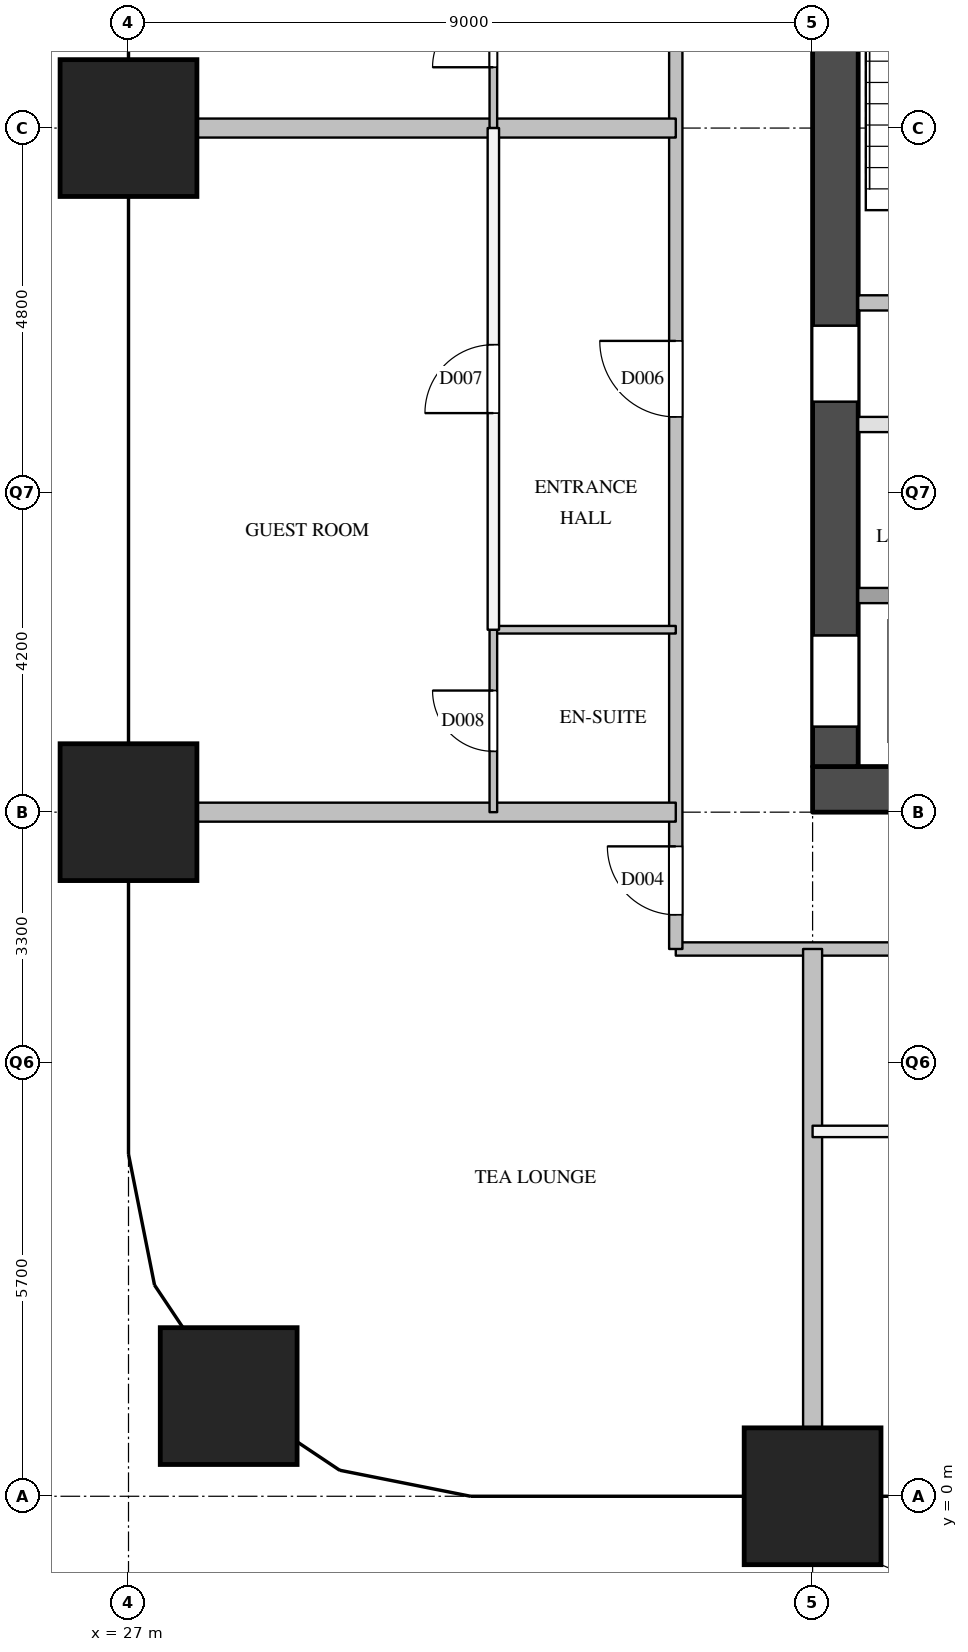
"""IFC4 building model, lengths in metres.
Left out: names, types, materials, properties, quantities, classifications, styles, units other than length and angle.
Written with IfcOpenShell. Run it as: python <this file> out.ifc"""

import sys

from ifc_helpers import new_model, si_unit, direction, frame, frame_2d, origin, origin_2d, place, context, subcontext, project, spatial, rectangle, extrude, element, fill, save


model = new_model("IFC4")
c1 = context("Model", 3, precision=1e-05, world=origin(), true_north=direction((0.0, 1.0)))
c2 = subcontext(c1, "Body", "Model", "MODEL_VIEW")
j1 = project(units=[si_unit("LENGTHUNIT", "METRE"), si_unit("PLANEANGLEUNIT", "RADIAN")], contexts=[c1])
p1 = place(None, origin())
s1 = spatial("IfcSite", under=j1, at=p1, CompositionType="ELEMENT")
p2 = place(p1, origin())
s2 = spatial("IfcBuilding", under=s1, at=p2, CompositionType="ELEMENT")
p3 = place(p2, frame((0.0, 0.0, 104.4)))
s3 = spatial("IfcBuildingStorey", under=s2, at=p3, CompositionType="ELEMENT", Elevation=104.4)
for number, where, z_axis, x_axis in (
    (1, (28.318, 1.318, 0.0), (0.0, 0.0, 1.0), (1.0, 0.0, 0.0)),
    (2, (27.0, 9.0, 0.0), (0.0, 0.0, 1.0), (1.0, 0.0, 0.0)),
    (3, (27.0, 18.0, 0.0), (0.0, 0.0, 1.0), (1.0, 0.0, 0.0)),
    (4, (36.0, 0.0, 0.0), (0.0, 0.0, 1.0), (1.0, 0.0, 0.0)),
):
    element("IfcColumn", number, at=place(p3, frame(where, z_axis=z_axis, x_axis=x_axis)), inside=s3, PredefinedType="COLUMN", context=c2, shape_type="SweptSolid", body=[
        extrude(rectangle(XDim=1.8, YDim=1.8, at=origin_2d()), origin(), (0.0, 0.0, 1.0), 3.8),
    ])
p4 = place(p3, frame((36.0, 9.3, 0.0), z_axis=(0.0, 0.0, 1.0), x_axis=(1.0, 0.0, 0.0)))
e5 = element("IfcWall", 5, at=p4, inside=s3, PredefinedType="SHEAR", context=c2, shape_type="SweptSolid", body=[
    extrude(rectangle(XDim=9.0, YDim=0.6, at=frame_2d((4.5, 0.0))), origin(), (0.0, 0.0, 1.0), 3.5),
])
p5 = place(p3, frame((36.3, 9.6, 0.0), z_axis=(0.0, 0.0, 1.0), x_axis=(0.0, 1.0, 0.0)))
e6 = element("IfcWall", 6, at=p5, inside=s3, PredefinedType="SHEAR", context=c2, shape_type="SweptSolid", body=[
    extrude(rectangle(XDim=12.3, YDim=0.6, at=frame_2d((6.15, 0.0))), origin(), (0.0, 0.0, 1.0), 3.5),
])
p6 = place(p5, frame((0.525, 0.0, 0.0)))
e7 = element("IfcOpeningElement", 7, at=p6, cuts=e6, PredefinedType="OPENING", context=c2, shape_type="SweptSolid", body=[
    extrude(rectangle(XDim=1.2, YDim=2.1, at=frame_2d((0.6, 1.05))), frame((0.0, 0.31, 0.0), z_axis=(0.0, -1.0, 0.0), x_axis=(1.0, 0.0, 0.0)), (0.0, 0.0, 1.0), 0.62),
])
p7 = place(p5, frame((4.8, 0.0, 0.0)))
e8 = element("IfcOpeningElement", 8, at=p7, cuts=e6, PredefinedType="OPENING", context=c2, shape_type="SweptSolid", body=[
    extrude(rectangle(XDim=1.0, YDim=2.1, at=frame_2d((0.5, 1.05))), frame((0.0, 0.31, 0.0), z_axis=(0.0, -1.0, 0.0), x_axis=(1.0, 0.0, 0.0)), (0.0, 0.0, 1.0), 0.62),
])
p8 = place(p3, frame((36.6, 11.85, 0.0), z_axis=(0.0, 0.0, 1.0), x_axis=(1.0, 0.0, 0.0)))
e9 = element("IfcWall", 9, at=p8, inside=s3, PredefinedType="SOLIDWALL", context=c2, shape_type="SweptSolid", body=[
    extrude(rectangle(XDim=7.8, YDim=0.2, at=frame_2d((3.9, 0.0))), origin(), (0.0, 0.0, 1.0), 3.5),
])
p9 = place(p3, frame((36.6, 14.1, 0.0), z_axis=(0.0, 0.0, 1.0), x_axis=(1.0, 0.0, 0.0)))
e10 = element("IfcWall", 10, at=p9, inside=s3, PredefinedType="PARTITIONING", context=c2, shape_type="SweptSolid", body=[
    extrude(rectangle(XDim=6.0, YDim=0.2, at=frame_2d((3.0, 0.0))), origin(), (0.0, 0.0, 1.0), 3.5),
])
p10 = place(p9, frame((0.9, 0.0, 0.0)))
e11 = element("IfcOpeningElement", 11, at=p10, cuts=e10, PredefinedType="OPENING", context=c2, shape_type="SweptSolid", body=[
    extrude(rectangle(XDim=0.9, YDim=2.1, at=frame_2d((0.45, 1.05))), frame((0.0, 0.11, 0.0), z_axis=(0.0, -1.0, 0.0), x_axis=(1.0, 0.0, 0.0)), (0.0, 0.0, 1.0), 0.22),
])
p11 = place(p9, frame((3.9, 0.0, 0.0)))
e12 = element("IfcOpeningElement", 12, at=p11, cuts=e10, PredefinedType="OPENING", context=c2, shape_type="SweptSolid", body=[
    extrude(rectangle(XDim=0.9, YDim=2.1, at=frame_2d((0.45, 1.05))), frame((0.0, 0.11, 0.0), z_axis=(0.0, -1.0, 0.0), x_axis=(1.0, 0.0, 0.0)), (0.0, 0.0, 1.0), 0.22),
])
p12 = place(p3, frame((36.6, 15.7, 0.0), z_axis=(0.0, 0.0, 1.0), x_axis=(1.0, 0.0, 0.0)))
e13 = element("IfcWall", 13, at=p12, inside=s3, PredefinedType="SOLIDWALL", context=c2, shape_type="SweptSolid", body=[
    extrude(rectangle(XDim=6.3, YDim=0.2, at=frame_2d((3.15, 0.0))), origin(), (0.0, 0.0, 1.0), 3.5),
])
p13 = place(p12, frame((1.025, 0.0, 0.0)))
e14 = element("IfcOpeningElement", 14, at=p13, cuts=e13, PredefinedType="OPENING", context=c2, shape_type="SweptSolid", body=[
    extrude(rectangle(XDim=1.1, YDim=2.1, at=frame_2d((0.55, 1.05))), frame((0.0, 0.11, 0.0), z_axis=(0.0, -1.0, 0.0), x_axis=(1.0, 0.0, 0.0)), (0.0, 0.0, 1.0), 0.22),
])
p14 = place(p12, frame((4.175, 0.0, 0.0)))
e15 = element("IfcOpeningElement", 15, at=p14, cuts=e13, PredefinedType="OPENING", context=c2, shape_type="SweptSolid", body=[
    extrude(rectangle(XDim=1.1, YDim=2.1, at=frame_2d((0.55, 1.05))), frame((0.0, 0.11, 0.0), z_axis=(0.0, -1.0, 0.0), x_axis=(1.0, 0.0, 0.0)), (0.0, 0.0, 1.0), 0.22),
])
p15 = place(p3, frame((34.2, 7.2, 0.0), z_axis=(0.0, 0.0, 1.0), x_axis=(1.0, 0.0, 0.0)))
e16 = element("IfcWall", 16, at=p15, inside=s3, PredefinedType="PARTITIONING", context=c2, shape_type="SweptSolid", body=[
    extrude(rectangle(XDim=12.6, YDim=0.175, at=frame_2d((6.3, 0.0))), origin(), (0.0, 0.0, 1.0), 3.5),
])
p16 = place(p15, frame((4.6, 0.0, 0.0)))
e17 = element("IfcOpeningElement", 17, at=p16, cuts=e16, PredefinedType="OPENING", context=c2, shape_type="SweptSolid", body=[
    extrude(rectangle(XDim=1.0, YDim=2.1, at=frame_2d((0.5, 1.05))), frame((0.0, 0.097, 0.0), z_axis=(0.0, -1.0, 0.0), x_axis=(1.0, 0.0, 0.0)), (0.0, 0.0, 1.0), 0.195),
])
p17 = place(p3, frame((34.2, 7.2, 0.0), z_axis=(0.0, 0.0, 1.0), x_axis=(0.0, 1.0, 0.0)))
e18 = element("IfcWall", 18, at=p17, inside=s3, PredefinedType="PARTITIONING", context=c2, shape_type="SweptSolid", body=[
    extrude(rectangle(XDim=16.49, YDim=0.175, at=frame_2d((8.245, 0.0))), origin(), (0.0, 0.0, 1.0), 3.5),
])
p18 = place(p17, frame((0.45, 0.0, 0.0)))
e19 = element("IfcOpeningElement", 19, at=p18, cuts=e18, PredefinedType="OPENING", context=c2, shape_type="SweptSolid", body=[
    extrude(rectangle(XDim=0.9, YDim=2.1, at=frame_2d((0.45, 1.05))), frame((0.0, 0.097, 0.0), z_axis=(0.0, -1.0, 0.0), x_axis=(1.0, 0.0, 0.0)), (0.0, 0.0, 1.0), 0.195),
])
p19 = place(p17, frame((7.0, 0.0, 0.0)))
e20 = element("IfcOpeningElement", 20, at=p19, cuts=e18, PredefinedType="OPENING", context=c2, shape_type="SweptSolid", body=[
    extrude(rectangle(XDim=1.0, YDim=2.1, at=frame_2d((0.5, 1.05))), frame((0.0, 0.097, 0.0), z_axis=(0.0, -1.0, 0.0), x_axis=(1.0, 0.0, 0.0)), (0.0, 0.0, 1.0), 0.195),
])
p20 = place(p17, frame((14.345, 0.0, 0.0)))
e21 = element("IfcOpeningElement", 21, at=p20, cuts=e18, PredefinedType="OPENING", context=c2, shape_type="SweptSolid", body=[
    extrude(rectangle(XDim=1.0, YDim=2.1, at=frame_2d((0.5, 1.05))), frame((0.0, 0.097, 0.0), z_axis=(0.0, -1.0, 0.0), x_axis=(1.0, 0.0, 0.0)), (0.0, 0.0, 1.0), 0.195),
])
p21 = place(p3, frame((36.0, 4.8, 0.0), z_axis=(0.0, 0.0, 1.0), x_axis=(1.0, 0.0, 0.0)))
e22 = element("IfcWall", 22, at=p21, inside=s3, PredefinedType="PARTITIONING", context=c2, shape_type="SweptSolid", body=[
    extrude(rectangle(XDim=6.6, YDim=0.15, at=frame_2d((3.3, 0.0))), origin(), (0.0, 0.0, 1.0), 3.5),
])
p22 = place(p21, frame((2.85, 0.0, 0.0)))
e23 = element("IfcOpeningElement", 23, at=p22, cuts=e22, PredefinedType="OPENING", context=c2, shape_type="SweptSolid", body=[
    extrude(rectangle(XDim=0.9, YDim=2.1, at=frame_2d((0.45, 1.05))), frame((0.0, 0.085, 0.0), z_axis=(0.0, -1.0, 0.0), x_axis=(1.0, 0.0, 0.0)), (0.0, 0.0, 1.0), 0.17),
])
p23 = place(p3, frame((31.8, 11.4, 0.0), z_axis=(0.0, 0.0, 1.0), x_axis=(0.0, 1.0, 0.0)))
e24 = element("IfcWall", 24, at=p23, inside=s3, PredefinedType="PARTITIONING", context=c2, shape_type="SweptSolid", body=[
    extrude(rectangle(XDim=6.6, YDim=0.15, at=frame_2d((3.3, 0.0))), origin(), (0.0, 0.0, 1.0), 3.5),
])
p24 = place(p23, frame((2.85, 0.0, 0.0)))
e25 = element("IfcOpeningElement", 25, at=p24, cuts=e24, PredefinedType="OPENING", context=c2, shape_type="SweptSolid", body=[
    extrude(rectangle(XDim=0.9, YDim=2.1, at=frame_2d((0.45, 1.05))), frame((0.0, 0.085, 0.0), z_axis=(0.0, -1.0, 0.0), x_axis=(1.0, 0.0, 0.0)), (0.0, 0.0, 1.0), 0.17),
])
for number, where, z_axis, x_axis in (
    (26, (27.0, 9.0, 0.0), (0.0, 0.0, 1.0), (1.0, 0.0, 0.0)),
    (27, (27.0, 18.0, 0.0), (0.0, 0.0, 1.0), (1.0, 0.0, 0.0)),
    (28, (36.0, 0.0, 0.0), (0.0, 0.0, 1.0), (0.0, 1.0, 0.0)),
):
    element("IfcWall", number, at=place(p3, frame(where, z_axis=z_axis, x_axis=x_axis)), inside=s3, PredefinedType="PARTITIONING", context=c2, shape_type="SweptSolid", body=[
        extrude(rectangle(XDim=7.2, YDim=0.25, at=frame_2d((3.6, 0.0))), origin(), (0.0, 0.0, 1.0), 3.5),
    ])
p25 = place(p3, frame((31.8, 11.4, 0.0), z_axis=(0.0, 0.0, 1.0), x_axis=(1.0, 0.0, 0.0)))
e29 = element("IfcWall", 29, at=p25, inside=s3, PredefinedType="PARTITIONING", context=c2, shape_type="SweptSolid", body=[
    extrude(rectangle(XDim=2.4, YDim=0.1, at=frame_2d((1.2, 0.0))), origin(), (0.0, 0.0, 1.0), 3.5),
])
p26 = place(p3, frame((31.8, 9.0, 0.0), z_axis=(0.0, 0.0, 1.0), x_axis=(0.0, 1.0, 0.0)))
e30 = element("IfcWall", 30, at=p26, inside=s3, PredefinedType="PARTITIONING", context=c2, shape_type="SweptSolid", body=[
    extrude(rectangle(XDim=2.4, YDim=0.1, at=frame_2d((1.2, 0.0))), origin(), (0.0, 0.0, 1.0), 3.5),
])
p27 = place(p26, frame((0.8, 0.0, 0.0)))
e31 = element("IfcOpeningElement", 31, at=p27, cuts=e30, PredefinedType="OPENING", context=c2, shape_type="SweptSolid", body=[
    extrude(rectangle(XDim=0.8, YDim=2.1, at=frame_2d((0.4, 1.05))), frame((0.0, 0.06, 0.0), z_axis=(0.0, -1.0, 0.0), x_axis=(1.0, 0.0, 0.0)), (0.0, 0.0, 1.0), 0.12),
])
p28 = place(p3, frame((31.8, 18.0, 0.0), z_axis=(0.0, 0.0, 1.0), x_axis=(0.0, 1.0, 0.0)))
e32 = element("IfcWall", 32, at=p28, inside=s3, PredefinedType="PARTITIONING", context=c2, shape_type="SweptSolid", body=[
    extrude(rectangle(XDim=2.4, YDim=0.1, at=frame_2d((1.2, 0.0))), origin(), (0.0, 0.0, 1.0), 3.5),
])
p29 = place(p28, frame((0.8, 0.0, 0.0)))
e33 = element("IfcOpeningElement", 33, at=p29, cuts=e32, PredefinedType="OPENING", context=c2, shape_type="SweptSolid", body=[
    extrude(rectangle(XDim=0.8, YDim=2.1, at=frame_2d((0.4, 1.05))), frame((0.0, 0.06, 0.0), z_axis=(0.0, -1.0, 0.0), x_axis=(1.0, 0.0, 0.0)), (0.0, 0.0, 1.0), 0.12),
])
p30 = place(p6, origin())
e34 = element("IfcDoor", 34, at=p30, inside=s3, OperationType="SLIDING_TO_LEFT", PredefinedType="DOOR", context=c2, shape_type="SweptSolid", body=[
    extrude(rectangle(XDim=1.2, YDim=2.1, at=frame_2d((0.6, 1.05))), frame((0.0, 0.025, 0.0), z_axis=(0.0, -1.0, 0.0), x_axis=(1.0, 0.0, 0.0)), (0.0, 0.0, 1.0), 0.05),
])
fill(e7, e34)
p31 = place(p7, origin())
e35 = element("IfcDoor", 35, at=p31, inside=s3, OperationType="SINGLE_SWING_LEFT", PredefinedType="DOOR", context=c2, shape_type="SweptSolid", body=[
    extrude(rectangle(XDim=1.0, YDim=2.1, at=frame_2d((0.5, 1.05))), frame((0.0, 0.025, 0.0), z_axis=(0.0, -1.0, 0.0), x_axis=(1.0, 0.0, 0.0)), (0.0, 0.0, 1.0), 0.05),
])
fill(e8, e35)
p32 = place(p18, origin())
e36 = element("IfcDoor", 36, at=p32, inside=s3, OperationType="SINGLE_SWING_RIGHT", PredefinedType="DOOR", context=c2, shape_type="SweptSolid", body=[
    extrude(rectangle(XDim=0.9, YDim=2.1, at=frame_2d((0.45, 1.05))), frame((0.0, 0.025, 0.0), z_axis=(0.0, -1.0, 0.0), x_axis=(1.0, 0.0, 0.0)), (0.0, 0.0, 1.0), 0.05),
])
fill(e19, e36)
p33 = place(p19, origin())
e37 = element("IfcDoor", 37, at=p33, inside=s3, OperationType="SINGLE_SWING_RIGHT", PredefinedType="DOOR", context=c2, shape_type="SweptSolid", body=[
    extrude(rectangle(XDim=1.0, YDim=2.1, at=frame_2d((0.5, 1.05))), frame((0.0, 0.025, 0.0), z_axis=(0.0, -1.0, 0.0), x_axis=(1.0, 0.0, 0.0)), (0.0, 0.0, 1.0), 0.05),
])
fill(e20, e37)
p34 = place(p24, origin())
e38 = element("IfcDoor", 38, at=p34, inside=s3, OperationType="SINGLE_SWING_LEFT", PredefinedType="DOOR", context=c2, shape_type="SweptSolid", body=[
    extrude(rectangle(XDim=0.9, YDim=2.1, at=frame_2d((0.45, 1.05))), frame((0.0, 0.025, 0.0), z_axis=(0.0, -1.0, 0.0), x_axis=(1.0, 0.0, 0.0)), (0.0, 0.0, 1.0), 0.05),
])
fill(e25, e38)
p35 = place(p27, origin())
e39 = element("IfcDoor", 39, at=p35, inside=s3, OperationType="SINGLE_SWING_RIGHT", PredefinedType="DOOR", context=c2, shape_type="SweptSolid", body=[
    extrude(rectangle(XDim=0.8, YDim=2.1, at=frame_2d((0.4, 1.05))), frame((0.0, 0.025, 0.0), z_axis=(0.0, -1.0, 0.0), x_axis=(1.0, 0.0, 0.0)), (0.0, 0.0, 1.0), 0.05),
])
fill(e31, e39)
p36 = place(p29, origin())
e40 = element("IfcDoor", 40, at=p36, inside=s3, OperationType="SINGLE_SWING_LEFT", PredefinedType="DOOR", context=c2, shape_type="SweptSolid", body=[
    extrude(rectangle(XDim=0.8, YDim=2.1, at=frame_2d((0.4, 1.05))), frame((0.0, 0.025, 0.0), z_axis=(0.0, -1.0, 0.0), x_axis=(1.0, 0.0, 0.0)), (0.0, 0.0, 1.0), 0.05),
])
fill(e33, e40)
save(model, sys.argv[1])
